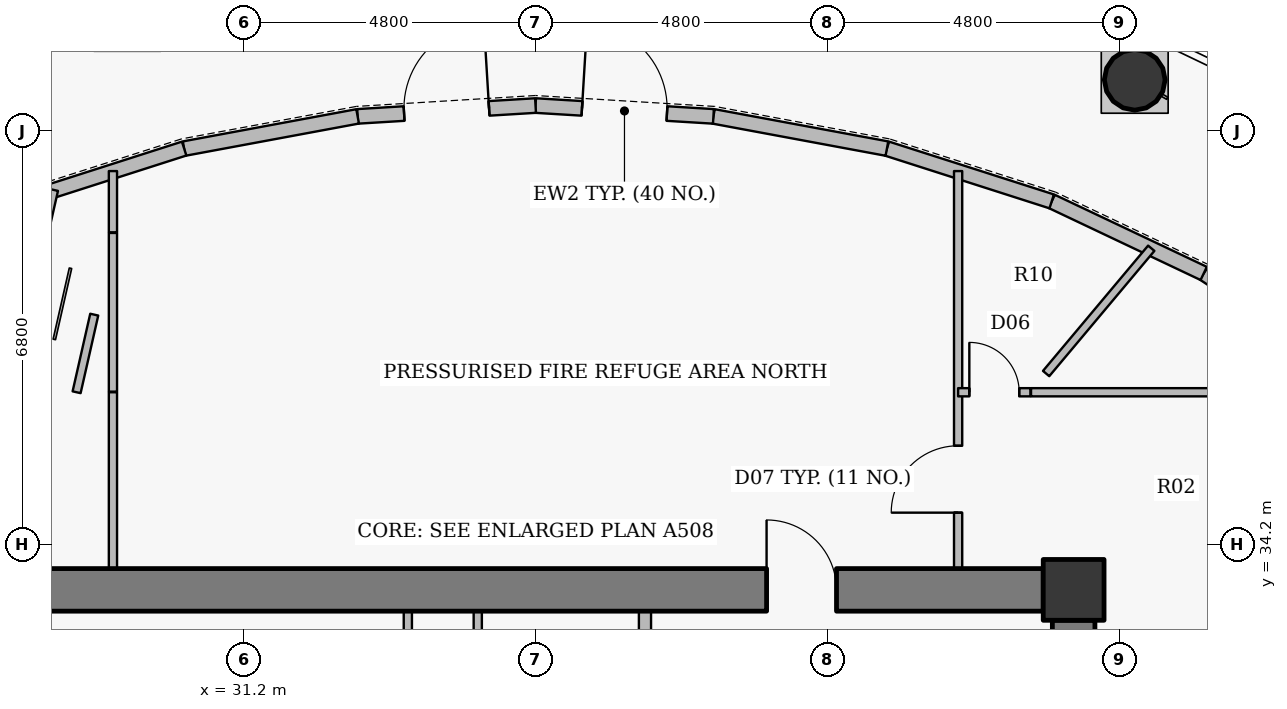
"""IFC4 building model, lengths in metres.
Left out: names, types, materials, properties, quantities, classifications, styles, units other than length and angle.
Written with IfcOpenShell. Run it as: python <this file> out.ifc"""

import sys

from ifc_helpers import new_model, si_unit, direction, frame, frame_2d, origin, origin_2d, place, context, subcontext, project, spatial, rectangle, hollow_circle, extrude, source, transform, mapped, element, fill, save


model = new_model("IFC4")
c1 = context("Model", 3, precision=1e-05, world=origin(), true_north=direction((0.0, 1.0)))
c2 = subcontext(c1, "Body", "Model", "MODEL_VIEW")
j1 = project(units=[si_unit("LENGTHUNIT", "METRE"), si_unit("PLANEANGLEUNIT", "RADIAN")], contexts=[c1])
p1 = place(None, origin())
s1 = spatial("IfcSite", under=j1, at=p1, CompositionType="ELEMENT")
p2 = place(p1, origin())
s2 = spatial("IfcBuilding", under=s1, at=p2, CompositionType="ELEMENT")
p3 = place(p2, frame((0.0, 0.0, 318.0)))
s3 = spatial("IfcBuildingStorey", under=s2, at=p3, CompositionType="ELEMENT", Elevation=318.0)
p4 = place(p3, frame((44.85, 33.45, 0.0), z_axis=(0.0, 0.0, 1.0), x_axis=(1.0, 0.0, 0.0)))
e1 = element("IfcColumn", 1, at=p4, inside=s3, PredefinedType="COLUMN", context=c2, shape_type="SweptSolid", body=[
    extrude(rectangle(XDim=1.0, YDim=1.0, at=origin_2d()), origin(), (0.0, 0.0, 1.0), 6.0),
])
p5 = place(p3, frame((27.65, 33.45, 0.0), z_axis=(0.0, 0.0, 1.0), x_axis=(1.0, 0.0, 0.0)))
e2 = element("IfcWall", 2, at=p5, inside=s3, PredefinedType="SHEAR", context=c2, shape_type="SweptSolid", body=[
    extrude(rectangle(XDim=16.7, YDim=0.7, at=frame_2d((8.35, 0.0))), origin(), (0.0, 0.0, 1.0), 5.3),
])
p6 = place(p5, frame((12.15, 0.0, 0.0)))
e3 = element("IfcOpeningElement", 3, at=p6, cuts=e2, PredefinedType="OPENING", context=c2, shape_type="SweptSolid", body=[
    extrude(rectangle(XDim=1.15, YDim=2.15, at=origin_2d()), frame((0.575, 0.36, 1.075), z_axis=(0.0, -1.0, 0.0), x_axis=(1.0, 0.0, 0.0)), (0.0, 0.0, 1.0), 0.72),
])
p7 = place(p3, frame((44.85, 32.95, 0.0), z_axis=(0.0, 0.0, 1.0), x_axis=(0.0, -1.0, 0.0)))
e4 = element("IfcWall", 4, at=p7, inside=s3, PredefinedType="SHEAR", context=c2, shape_type="SweptSolid", body=[
    extrude(rectangle(XDim=11.9, YDim=0.7, at=frame_2d((5.95, 0.0))), origin(), (0.0, 0.0, 1.0), 5.3),
])
p8 = place(p7, frame((1.05, 0.0, 0.0)))
e5 = element("IfcOpeningElement", 5, at=p8, cuts=e4, PredefinedType="OPENING", context=c2, shape_type="SweptSolid", body=[
    extrude(rectangle(XDim=1.15, YDim=2.15, at=origin_2d()), frame((0.575, 0.36, 1.075), z_axis=(0.0, -1.0, 0.0), x_axis=(1.0, 0.0, 0.0)), (0.0, 0.0, 1.0), 0.72),
])
p9 = place(p3, frame((45.854, 41.839, 0.0), z_axis=(0.0, 0.0, 1.0), x_axis=(1.0, 0.0, 0.0)))
e6 = element("IfcColumn", 6, at=p9, inside=s3, PredefinedType="COLUMN", context=c2, shape_type="SweptSolid", body=[
    extrude(hollow_circle(Radius=0.5, WallThickness=0.032, at=origin_2d()), origin(), (0.0, 0.0, 1.0), 5.75),
])
p10 = place(p3, frame((46.989, 38.654, 0.0), z_axis=(0.0, 0.0, 1.0), x_axis=(0.834405901953, -0.551150424827, 0.0)))
e7 = element("IfcWall", 7, at=p10, inside=s3, PredefinedType="SOLIDWALL", context=c2, shape_type="SweptSolid", body=[
    extrude(rectangle(XDim=2.67, YDim=0.24, at=frame_2d((1.335, 0.0))), origin(), (0.0, 0.0, 1.0), 2.832),
])
p11 = place(p3, frame((44.489, 39.839, 0.0), z_axis=(0.0, 0.0, 1.0), x_axis=(0.903637179904, -0.428298782505, 0.0)))
e8 = element("IfcWall", 8, at=p11, inside=s3, PredefinedType="SOLIDWALL", context=c2, shape_type="SweptSolid", body=[
    extrude(rectangle(XDim=2.766, YDim=0.24, at=frame_2d((1.383, 0.0))), origin(), (0.0, 0.0, 1.0), 4.235),
])
p12 = place(p3, frame((41.779, 40.707, 0.0), z_axis=(0.0, 0.0, 1.0), x_axis=(0.952332464146, -0.305062088326, 0.0)))
e9 = element("IfcWall", 9, at=p12, inside=s3, PredefinedType="SOLIDWALL", context=c2, shape_type="SweptSolid", body=[
    extrude(rectangle(XDim=2.846, YDim=0.24, at=frame_2d((1.423, 0.0))), origin(), (0.0, 0.0, 1.0), 4.235),
])
p13 = place(p3, frame((38.926, 41.237, 0.0), z_axis=(0.0, 0.0, 1.0), x_axis=(0.983195423776, -0.182556179481, 0.0)))
e10 = element("IfcWall", 10, at=p13, inside=s3, PredefinedType="SOLIDWALL", context=c2, shape_type="SweptSolid", body=[
    extrude(rectangle(XDim=2.902, YDim=0.24, at=frame_2d((1.451, 0.0))), origin(), (0.0, 0.0, 1.0), 5.75),
])
p14 = place(p3, frame((36.0, 41.415, 0.0), z_axis=(0.0, 0.0, 1.0), x_axis=(0.998149855878, -0.060801852035, 0.0)))
e11 = element("IfcWall", 11, at=p14, inside=s3, PredefinedType="SOLIDWALL", context=c2, shape_type="SweptSolid", body=[
    extrude(rectangle(XDim=2.931, YDim=0.24, at=frame_2d((1.466, 0.0))), origin(), (0.0, 0.0, 1.0), 4.235),
])
p15 = place(p14, frame((0.766, 0.0, 0.0)))
e12 = element("IfcOpeningElement", 12, at=p15, cuts=e11, PredefinedType="OPENING", context=c2, shape_type="SweptSolid", body=[
    extrude(rectangle(XDim=1.4, YDim=2.2, at=origin_2d()), frame((0.7, 0.13, 1.1), z_axis=(0.0, -1.0, 0.0), x_axis=(1.0, 0.0, 0.0)), (0.0, 0.0, 1.0), 0.26),
])
p16 = place(p3, frame((33.074, 41.237, 0.0), z_axis=(0.0, 0.0, 1.0), x_axis=(0.998149855878, 0.060801852035, 0.0)))
e13 = element("IfcWall", 13, at=p16, inside=s3, PredefinedType="SOLIDWALL", context=c2, shape_type="SweptSolid", body=[
    extrude(rectangle(XDim=2.931, YDim=0.24, at=frame_2d((1.466, 0.0))), origin(), (0.0, 0.0, 1.0), 4.235),
])
p17 = place(p16, frame((0.766, 0.0, 0.0)))
e14 = element("IfcOpeningElement", 14, at=p17, cuts=e13, PredefinedType="OPENING", context=c2, shape_type="SweptSolid", body=[
    extrude(rectangle(XDim=1.4, YDim=2.2, at=origin_2d()), frame((0.7, 0.13, 1.1), z_axis=(0.0, -1.0, 0.0), x_axis=(1.0, 0.0, 0.0)), (0.0, 0.0, 1.0), 0.26),
])
p18 = place(p3, frame((30.221, 40.707, 0.0), z_axis=(0.0, 0.0, 1.0), x_axis=(0.983195423776, 0.182556179481, 0.0)))
e15 = element("IfcWall", 15, at=p18, inside=s3, PredefinedType="SOLIDWALL", context=c2, shape_type="SweptSolid", body=[
    extrude(rectangle(XDim=2.902, YDim=0.24, at=frame_2d((1.451, 0.0))), origin(), (0.0, 0.0, 1.0), 4.235),
])
p19 = place(p3, frame((27.511, 39.839, 0.0), z_axis=(0.0, 0.0, 1.0), x_axis=(0.952332464146, 0.305062088326, 0.0)))
e16 = element("IfcWall", 16, at=p19, inside=s3, PredefinedType="SOLIDWALL", context=c2, shape_type="SweptSolid", body=[
    extrude(rectangle(XDim=2.846, YDim=0.24, at=frame_2d((1.423, 0.0))), origin(), (0.0, 0.0, 1.0), 2.832),
])
p20 = place(p3, frame((29.05, 33.8, 0.0), z_axis=(0.0, 0.0, 1.0), x_axis=(0.0, 1.0, 0.0)))
e17 = element("IfcWall", 17, at=p20, inside=s3, PredefinedType="PARTITIONING", context=c2, shape_type="SweptSolid", body=[
    extrude(rectangle(XDim=2.9, YDim=0.135, at=frame_2d((1.45, 0.0))), origin(), (0.0, 0.0, 1.0), 5.75),
])
p21 = place(p3, frame((29.05, 39.33, 0.0), z_axis=(0.0, 0.0, 1.0), x_axis=(0.0, 1.0, 0.0)))
e18 = element("IfcWall", 18, at=p21, inside=s3, PredefinedType="PARTITIONING", context=c2, shape_type="SweptSolid", body=[
    extrude(rectangle(XDim=1.007, YDim=0.135, at=frame_2d((0.504, 0.0))), origin(), (0.0, 0.0, 1.0), 5.75),
])
p22 = place(p3, frame((33.9, 27.56, 0.0), z_axis=(0.0, 0.0, 1.0), x_axis=(0.0, 1.0, 0.0)))
e19 = element("IfcWall", 19, at=p22, inside=s3, PredefinedType="PARTITIONING", context=c2, shape_type="SweptSolid", body=[
    extrude(rectangle(XDim=5.54, YDim=0.135, at=frame_2d((2.77, 0.0))), origin(), (0.0, 0.0, 1.0), 5.335),
])
p23 = place(p22, frame((2.22, 0.0, 0.0)))
e20 = element("IfcOpeningElement", 20, at=p23, cuts=e19, PredefinedType="OPENING", context=c2, shape_type="SweptSolid", body=[
    extrude(rectangle(XDim=1.1, YDim=2.15, at=origin_2d()), frame((0.55, 0.078, 1.075), z_axis=(0.0, -1.0, 0.0), x_axis=(1.0, 0.0, 0.0)), (0.0, 0.0, 1.0), 0.155),
])
p24 = place(p3, frame((35.05, 31.05, 0.0), z_axis=(0.0, 0.0, 1.0), x_axis=(0.0, 1.0, 0.0)))
e21 = element("IfcWall", 21, at=p24, inside=s3, PredefinedType="PARTITIONING", context=c2, shape_type="SweptSolid", body=[
    extrude(rectangle(XDim=2.05, YDim=0.135, at=frame_2d((1.025, 0.0))), origin(), (0.0, 0.0, 1.0), 5.335),
])
p25 = place(p24, frame((0.475, 0.0, 0.0)))
e22 = element("IfcOpeningElement", 22, at=p25, cuts=e21, PredefinedType="OPENING", context=c2, shape_type="SweptSolid", body=[
    extrude(rectangle(XDim=1.1, YDim=2.15, at=origin_2d()), frame((0.55, 0.078, 1.075), z_axis=(0.0, -1.0, 0.0), x_axis=(1.0, 0.0, 0.0)), (0.0, 0.0, 1.0), 0.155),
])
p26 = place(p3, frame((37.8, 31.05, 0.0), z_axis=(0.0, 0.0, 1.0), x_axis=(0.0, 1.0, 0.0)))
e23 = element("IfcWall", 23, at=p26, inside=s3, PredefinedType="PARTITIONING", context=c2, shape_type="SweptSolid", body=[
    extrude(rectangle(XDim=2.05, YDim=0.2, at=frame_2d((1.025, 0.0))), origin(), (0.0, 0.0, 1.0), 5.335),
])
p27 = place(p3, frame((42.95, 33.8, 0.0), z_axis=(0.0, 0.0, 1.0), x_axis=(0.0, 1.0, 0.0)))
e24 = element("IfcWall", 24, at=p27, inside=s3, PredefinedType="PARTITIONING", context=c2, shape_type="SweptSolid", body=[
    extrude(rectangle(XDim=6.537, YDim=0.135, at=frame_2d((3.269, 0.0))), origin(), (0.0, 0.0, 1.0), 4.235),
])
p28 = place(p27, frame((0.92, 0.0, 0.0)))
e25 = element("IfcOpeningElement", 25, at=p28, cuts=e24, PredefinedType="OPENING", context=c2, shape_type="SweptSolid", body=[
    extrude(rectangle(XDim=1.1, YDim=2.15, at=origin_2d()), frame((0.55, 0.078, 1.075), z_axis=(0.0, -1.0, 0.0), x_axis=(1.0, 0.0, 0.0)), (0.0, 0.0, 1.0), 0.155),
])
p29 = place(p3, frame((42.95, 36.7, 0.0), z_axis=(0.0, 0.0, 1.0), x_axis=(1.0, 0.0, 0.0)))
e26 = element("IfcWall", 26, at=p29, inside=s3, PredefinedType="PARTITIONING", context=c2, shape_type="SweptSolid", body=[
    extrude(rectangle(XDim=1.189, YDim=0.135, at=frame_2d((0.595, 0.0))), origin(), (0.0, 0.0, 1.0), 5.75),
])
p30 = place(p29, frame((0.185, 0.0, 0.0)))
e27 = element("IfcOpeningElement", 27, at=p30, cuts=e26, PredefinedType="OPENING", context=c2, shape_type="SweptSolid", body=[
    extrude(rectangle(XDim=0.82, YDim=2.1, at=origin_2d()), frame((0.41, 0.078, 1.05), z_axis=(0.0, -1.0, 0.0), x_axis=(1.0, 0.0, 0.0)), (0.0, 0.0, 1.0), 0.155),
])
p31 = place(p3, frame((29.05, 36.71, 0.0), z_axis=(0.0, 0.0, 1.0), x_axis=(0.0, 1.0, 0.0)))
e28 = element("IfcWall", 28, at=p31, inside=s3, PredefinedType="PARTITIONING", context=c2, shape_type="SweptSolid", body=[
    extrude(rectangle(XDim=2.61, YDim=0.135, at=frame_2d((1.305, 0.0))), origin(), (0.0, 0.0, 1.0), 5.75),
])
p32 = place(p3, frame((27.643, 38.103, 0.0), z_axis=(0.0, 0.0, 1.0), x_axis=(0.221605059648, 0.975136502003, 0.0)))
e29 = element("IfcWall", 29, at=p32, inside=s3, PredefinedType="PARTITIONING", context=c2, shape_type="SweptSolid", body=[
    extrude(rectangle(XDim=1.973, YDim=0.135, at=frame_2d((0.987, 0.0))), origin(), (0.0, 0.0, 1.0), 5.75),
])
p33 = place(p3, frame((28.742, 37.976, 0.0), z_axis=(0.0, 0.0, 1.0), x_axis=(-0.221588855945, -0.975140184241, 0.0)))
e30 = element("IfcWall", 30, at=p33, inside=s3, PredefinedType="PARTITIONING", context=c2, shape_type="SweptSolid", body=[
    extrude(rectangle(XDim=1.309, YDim=0.135, at=frame_2d((0.654, 0.0))), origin(), (0.0, 0.0, 1.0), 5.75),
])
p34 = place(p3, frame((45.2, 32.96, 0.0), z_axis=(0.0, 0.0, 1.0), x_axis=(0.0, 1.0, 0.0)))
e31 = element("IfcWall", 31, at=p34, inside=s3, PredefinedType="PARTITIONING", context=c2, shape_type="SweptSolid", body=[
    extrude(rectangle(XDim=0.84, YDim=0.135, at=frame_2d((0.42, 0.0))), origin(), (0.0, 0.0, 1.0), 2.832),
])
p35 = place(p3, frame((44.893, 33.8, 0.0), z_axis=(0.0, 0.0, 1.0), x_axis=(-1.0, 0.0, 0.0)))
e32 = element("IfcWall", 32, at=p35, inside=s3, PredefinedType="PARTITIONING", context=c2, shape_type="SweptSolid", body=[
    extrude(rectangle(XDim=0.532, YDim=0.135, at=frame_2d((0.266, 0.0))), origin(), (0.0, 0.0, 1.0), 4.235),
])
p36 = place(p3, frame((44.149, 36.7, 0.0), z_axis=(0.0, 0.0, 1.0), x_axis=(1.0, 0.0, 0.0)))
e33 = element("IfcWall", 33, at=p36, inside=s3, PredefinedType="PARTITIONING", context=c2, shape_type="SweptSolid", body=[
    extrude(rectangle(XDim=3.809, YDim=0.135, at=frame_2d((1.904, 0.0))), origin(), (0.0, 0.0, 1.0), 5.335),
])
p37 = place(p3, frame((46.127, 39.068, 0.0), z_axis=(0.0, 0.0, 1.0), x_axis=(-0.642849381004, -0.765992606585, 0.0)))
e34 = element("IfcWall", 34, at=p37, inside=s3, PredefinedType="PARTITIONING", context=c2, shape_type="SweptSolid", body=[
    extrude(rectangle(XDim=2.69, YDim=0.135, at=frame_2d((1.345, 0.0))), origin(), (0.0, 0.0, 1.0), 5.335),
])
m1 = source(origin(), c2, "Body", "SweptSolid", [
    extrude(rectangle(XDim=1.4, YDim=2.2, at=origin_2d()), frame((0.7, 0.025, 1.1), z_axis=(0.0, -1.0, 0.0), x_axis=(1.0, 0.0, 0.0)), (0.0, 0.0, 1.0), 0.05),
])
p38 = place(p15, origin())
e35 = element("IfcDoor", 35, at=p38, inside=s3, OperationType="SINGLE_SWING_LEFT", PredefinedType="DOOR", context=c2, shape_type="MappedRepresentation", body=[
    mapped(m1, transform((0.0, 0.0, 0.0), x_axis=(1.0, 0.0, 0.0), y_axis=(0.0, 1.0, 0.0), z_axis=(0.0, 0.0, 1.0), scale=1.0)),
])
fill(e12, e35)
p39 = place(p17, origin())
e36 = element("IfcDoor", 36, at=p39, inside=s3, OperationType="SINGLE_SWING_RIGHT", PredefinedType="DOOR", context=c2, shape_type="MappedRepresentation", body=[
    mapped(m1, transform((0.0, 0.0, 0.0), x_axis=(1.0, 0.0, 0.0), y_axis=(0.0, 1.0, 0.0), z_axis=(0.0, 0.0, 1.0), scale=1.0)),
])
fill(e14, e36)
m2 = source(origin(), c2, "Body", "SweptSolid", [
    extrude(rectangle(XDim=1.15, YDim=2.15, at=origin_2d()), frame((0.575, 0.025, 1.075), z_axis=(0.0, -1.0, 0.0), x_axis=(1.0, 0.0, 0.0)), (0.0, 0.0, 1.0), 0.05),
])
p40 = place(p6, origin())
e37 = element("IfcDoor", 37, at=p40, inside=s3, OperationType="SINGLE_SWING_LEFT", PredefinedType="DOOR", context=c2, shape_type="MappedRepresentation", body=[
    mapped(m2, transform((0.0, 0.0, 0.0), x_axis=(1.0, 0.0, 0.0), y_axis=(0.0, 1.0, 0.0), z_axis=(0.0, 0.0, 1.0), scale=1.0)),
])
fill(e3, e37)
m3 = source(origin(), c2, "Body", "SweptSolid", [
    extrude(rectangle(XDim=1.1, YDim=2.15, at=origin_2d()), frame((0.55, 0.025, 1.075), z_axis=(0.0, -1.0, 0.0), x_axis=(1.0, 0.0, 0.0)), (0.0, 0.0, 1.0), 0.05),
])
p41 = place(p28, origin())
e38 = element("IfcDoor", 38, at=p41, inside=s3, OperationType="SINGLE_SWING_LEFT", PredefinedType="DOOR", context=c2, shape_type="MappedRepresentation", body=[
    mapped(m3, transform((0.0, 0.0, 0.0), x_axis=(1.0, 0.0, 0.0), y_axis=(0.0, 1.0, 0.0), z_axis=(0.0, 0.0, 1.0), scale=1.0)),
])
fill(e25, e38)
m4 = source(origin(), c2, "Body", "SweptSolid", [
    extrude(rectangle(XDim=0.82, YDim=2.1, at=origin_2d()), frame((0.41, 0.025, 1.05), z_axis=(0.0, -1.0, 0.0), x_axis=(1.0, 0.0, 0.0)), (0.0, 0.0, 1.0), 0.05),
])
p42 = place(p30, origin())
e39 = element("IfcDoor", 39, at=p42, inside=s3, OperationType="SINGLE_SWING_LEFT", PredefinedType="DOOR", context=c2, shape_type="MappedRepresentation", body=[
    mapped(m4, transform((0.0, 0.0, 0.0), x_axis=(1.0, 0.0, 0.0), y_axis=(0.0, 1.0, 0.0), z_axis=(0.0, 0.0, 1.0), scale=1.0)),
])
fill(e27, e39)
save(model, sys.argv[1])
